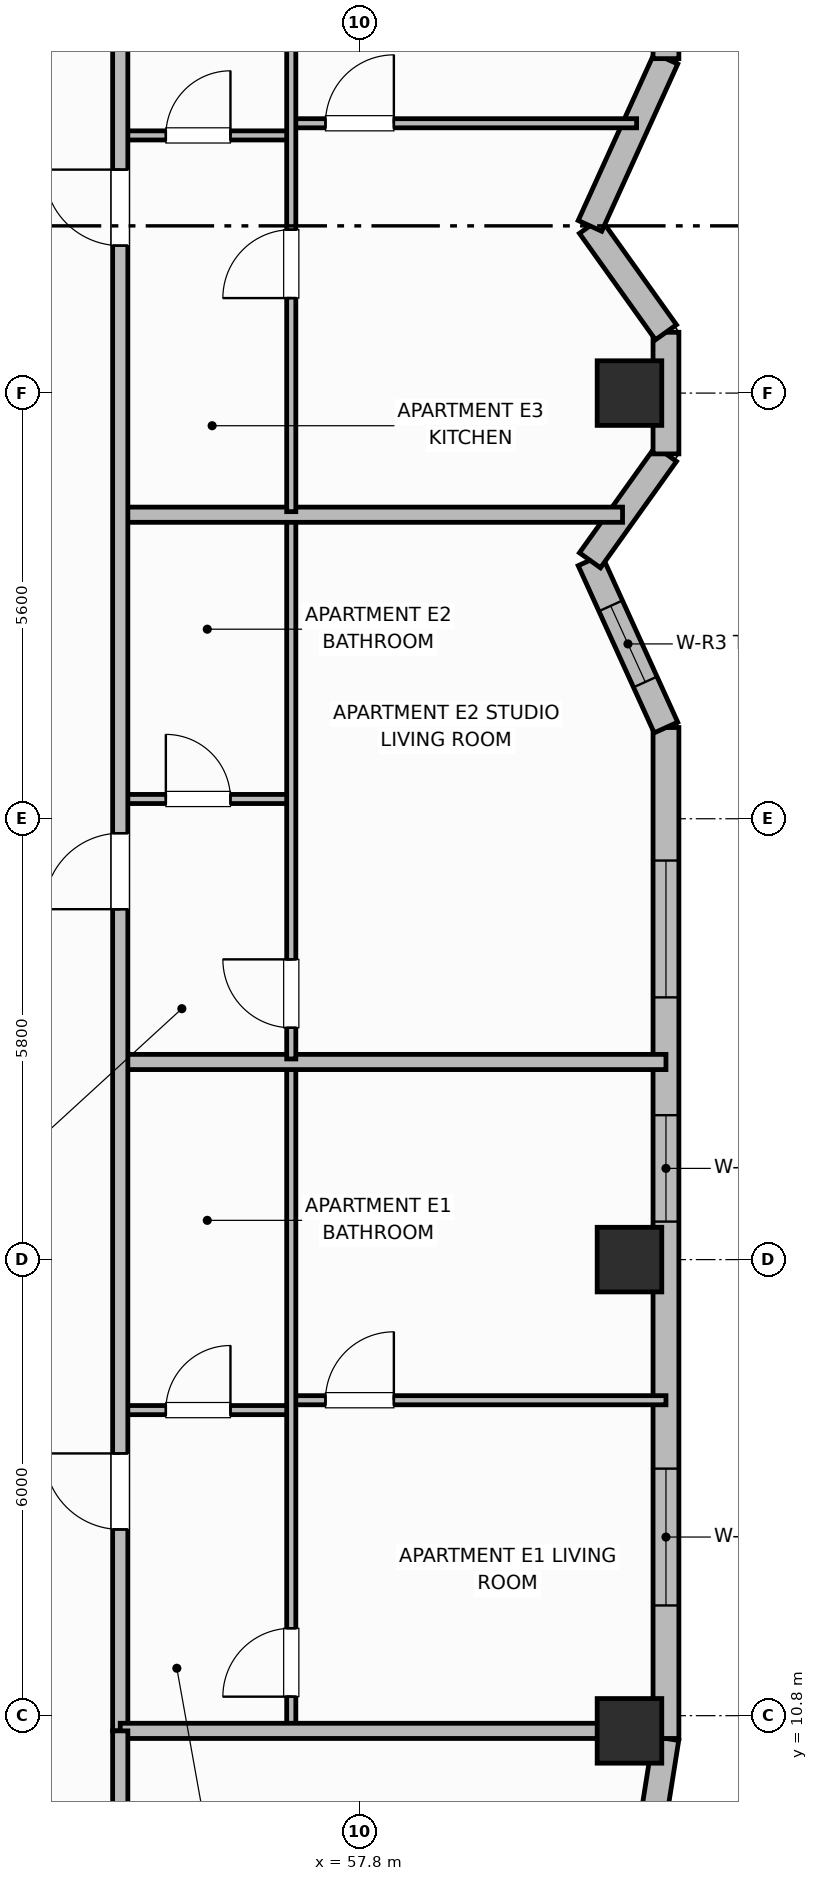
"""IFC4 building model, lengths in metres.
Left out: names, types, materials, properties, quantities, classifications, styles, units other than length and angle.
Written with IfcOpenShell. Run it as: python <this file> out.ifc"""

import sys

from ifc_helpers import new_model, si_unit, direction, frame, frame_2d, origin, origin_2d, place, context, subcontext, project, spatial, rectangle, extrude, element, fill, save


model = new_model("IFC4")
c1 = context("Model", 3, precision=1e-05, world=origin(), true_north=direction((0.0, 1.0)))
c2 = subcontext(c1, "Body", "Model", "MODEL_VIEW")
j1 = project(units=[si_unit("LENGTHUNIT", "METRE"), si_unit("PLANEANGLEUNIT", "RADIAN")], contexts=[c1])
p1 = place(None, origin())
s1 = spatial("IfcSite", under=j1, at=p1, CompositionType="ELEMENT")
p2 = place(p1, origin())
s2 = spatial("IfcBuilding", under=s1, at=p2, CompositionType="ELEMENT")
p3 = place(p2, frame((0.0, 0.0, 218.4)))
s3 = spatial("IfcBuildingStorey", under=s2, at=p3, CompositionType="ELEMENT", Elevation=218.4)
for number, where, z_axis, x_axis in (
    (1, (61.35, 10.6, 0.0), (0.0, 0.0, 1.0), (1.0, 0.0, 0.0)),
    (2, (61.35, 16.8, 0.0), (0.0, 0.0, 1.0), (1.0, 0.0, 0.0)),
    (3, (61.35, 28.2, 0.0), (0.0, 0.0, 1.0), (1.0, 0.0, 0.0)),
):
    element("IfcColumn", number, at=place(p3, frame(where, z_axis=z_axis, x_axis=x_axis)), inside=s3, PredefinedType="COLUMN", context=c2, shape_type="SweptSolid", body=[
        extrude(rectangle(XDim=0.85, YDim=0.85, at=origin_2d()), origin(), (0.0, 0.0, 1.0), 3.7),
    ])
p4 = place(p3, frame((61.652, 9.378, 0.0), z_axis=(0.0, 0.0, 1.0), x_axis=(0.156514556949, 0.987675651954, 0.0)))
e4 = element("IfcWall", 4, at=p4, inside=s3, PredefinedType="SOLIDWALL", context=c2, shape_type="SweptSolid", body=[
    extrude(rectangle(XDim=1.135, YDim=0.34, at=frame_2d((0.568, 0.0))), origin(), (0.0, 0.0, 1.0), 2.72),
])
p5 = place(p3, frame((61.83, 10.5, 0.0), z_axis=(0.0, 0.0, 1.0), x_axis=(0.0, 1.0, 0.0)))
e5 = element("IfcWall", 5, at=p5, inside=s3, PredefinedType="SOLIDWALL", context=c2, shape_type="SweptSolid", body=[
    extrude(rectangle(XDim=13.3, YDim=0.34, at=frame_2d((6.65, 0.0))), origin(), (0.0, 0.0, 1.0), 2.72),
])
p6 = place(p5, frame((1.75, 0.0, 0.75)))
e6 = element("IfcOpeningElement", 6, at=p6, cuts=e5, PredefinedType="OPENING", context=c2, shape_type="SweptSolid", body=[
    extrude(rectangle(XDim=1.8, YDim=1.85, at=frame_2d((0.9, 0.925))), frame((0.0, 0.18, 0.0), z_axis=(0.0, -1.0, 0.0), x_axis=(1.0, 0.0, 0.0)), (0.0, 0.0, 1.0), 0.36),
])
p7 = place(p5, frame((6.8, 0.0, 0.71)))
e7 = element("IfcOpeningElement", 7, at=p7, cuts=e5, PredefinedType="OPENING", context=c2, shape_type="SweptSolid", body=[
    extrude(rectangle(XDim=1.4, YDim=1.85, at=frame_2d((0.7, 0.925))), frame((0.0, 0.18, 0.0), z_axis=(0.0, -1.0, 0.0), x_axis=(1.0, 0.0, 0.0)), (0.0, 0.0, 1.0), 0.36),
])
p8 = place(p5, frame((9.75, 0.0, 0.75)))
e8 = element("IfcOpeningElement", 8, at=p8, cuts=e5, PredefinedType="OPENING", context=c2, shape_type="SweptSolid", body=[
    extrude(rectangle(XDim=1.8, YDim=1.85, at=frame_2d((0.9, 0.925))), frame((0.0, 0.18, 0.0), z_axis=(0.0, -1.0, 0.0), x_axis=(1.0, 0.0, 0.0)), (0.0, 0.0, 1.0), 0.36),
])
p9 = place(p3, frame((61.83, 23.8, 0.0), z_axis=(0.0, 0.0, 1.0), x_axis=(-0.413810555983, 0.910363017569, 0.0)))
e9 = element("IfcWall", 9, at=p9, inside=s3, PredefinedType="SOLIDWALL", context=c2, shape_type="SweptSolid", body=[
    extrude(rectangle(XDim=2.417, YDim=0.34, at=frame_2d((1.208, 0.0))), origin(), (0.0, 0.0, 1.0), 2.72),
])
p10 = place(p9, frame((0.658, 0.0, 0.91)))
e10 = element("IfcOpeningElement", 10, at=p10, cuts=e9, PredefinedType="OPENING", context=c2, shape_type="SweptSolid", body=[
    extrude(rectangle(XDim=1.1, YDim=1.65, at=frame_2d((0.55, 0.825))), frame((0.0, 0.18, 0.0), z_axis=(0.0, -1.0, 0.0), x_axis=(1.0, 0.0, 0.0)), (0.0, 0.0, 1.0), 0.36),
])
p11 = place(p3, frame((60.83, 26.0, 0.0), z_axis=(0.0, 0.0, 1.0), x_axis=(0.581265041318, 0.813714293681, 0.0)))
e11 = element("IfcWall", 11, at=p11, inside=s3, PredefinedType="SOLIDWALL", context=c2, shape_type="SweptSolid", body=[
    extrude(rectangle(XDim=1.72, YDim=0.34, at=frame_2d((0.86, 0.0))), origin(), (0.0, 0.0, 1.0), 2.72),
])
p12 = place(p3, frame((61.83, 27.4, 0.0), z_axis=(0.0, 0.0, 1.0), x_axis=(0.0, 1.0, 0.0)))
e12 = element("IfcWall", 12, at=p12, inside=s3, PredefinedType="SOLIDWALL", context=c2, shape_type="SweptSolid", body=[
    extrude(rectangle(XDim=1.6, YDim=0.34, at=frame_2d((0.8, 0.0))), origin(), (0.0, 0.0, 1.0), 2.72),
])
p13 = place(p3, frame((61.83, 29.0, 0.0), z_axis=(0.0, 0.0, 1.0), x_axis=(-0.581265041318, 0.813714293681, 0.0)))
e13 = element("IfcWall", 13, at=p13, inside=s3, PredefinedType="SOLIDWALL", context=c2, shape_type="SweptSolid", body=[
    extrude(rectangle(XDim=1.72, YDim=0.34, at=frame_2d((0.86, 0.0))), origin(), (0.0, 0.0, 1.0), 2.72),
])
p14 = place(p3, frame((60.83, 30.4, 0.0), z_axis=(0.0, 0.0, 1.0), x_axis=(0.413772500085, 0.910380315128, 0.0)))
e14 = element("IfcWall", 14, at=p14, inside=s3, PredefinedType="SOLIDWALL", context=c2, shape_type="SweptSolid", body=[
    extrude(rectangle(XDim=2.417, YDim=0.34, at=frame_2d((1.208, 0.0))), origin(), (0.0, 0.0, 1.0), 2.72),
])
p15 = place(p3, frame((61.83, 32.6, 0.0), z_axis=(0.0, 0.0, 1.0), x_axis=(0.0, 1.0, 0.0)))
e15 = element("IfcWall", 15, at=p15, inside=s3, PredefinedType="SOLIDWALL", context=c2, shape_type="SweptSolid", body=[
    extrude(rectangle(XDim=13.3, YDim=0.34, at=frame_2d((6.65, 0.0))), origin(), (0.0, 0.0, 1.0), 2.72),
])
p16 = place(p15, frame((1.7, 0.0, 0.0)))
e16 = element("IfcOpeningElement", 16, at=p16, cuts=e15, PredefinedType="OPENING", context=c2, shape_type="SweptSolid", body=[
    extrude(rectangle(XDim=1.6, YDim=2.1, at=frame_2d((0.8, 1.05))), frame((0.0, 0.18, 0.0), z_axis=(0.0, -1.0, 0.0), x_axis=(1.0, 0.0, 0.0)), (0.0, 0.0, 1.0), 0.36),
])
p17 = place(p15, frame((9.85, 0.0, 0.7)))
e17 = element("IfcOpeningElement", 17, at=p17, cuts=e15, PredefinedType="OPENING", context=c2, shape_type="SweptSolid", body=[
    extrude(rectangle(XDim=1.6, YDim=1.9, at=frame_2d((0.8, 0.95))), frame((0.0, 0.18, 0.0), z_axis=(0.0, -1.0, 0.0), x_axis=(1.0, 0.0, 0.0)), (0.0, 0.0, 1.0), 0.36),
])
p18 = place(p3, frame((54.65, 14.82, 0.0), z_axis=(0.0, 0.0, 1.0), x_axis=(1.0, 0.0, 0.0)))
e18 = element("IfcWall", 18, at=p18, inside=s3, PredefinedType="PARTITIONING", context=c2, shape_type="SweptSolid", body=[
    extrude(rectangle(XDim=2.25, YDim=0.12, at=frame_2d((1.125, 0.0))), origin(), (0.0, 0.0, 1.0), 2.55),
])
p19 = place(p18, frame((0.6, 0.0, 0.0)))
e19 = element("IfcOpeningElement", 19, at=p19, cuts=e18, PredefinedType="OPENING", context=c2, shape_type="SweptSolid", body=[
    extrude(rectangle(XDim=0.85, YDim=2.1, at=frame_2d((0.425, 1.05))), frame((0.0, 0.07, 0.0), z_axis=(0.0, -1.0, 0.0), x_axis=(1.0, 0.0, 0.0)), (0.0, 0.0, 1.0), 0.14),
])
p20 = place(p3, frame((56.9, 14.95, 0.0), z_axis=(0.0, 0.0, 1.0), x_axis=(1.0, 0.0, 0.0)))
e20 = element("IfcWall", 20, at=p20, inside=s3, PredefinedType="PARTITIONING", context=c2, shape_type="SweptSolid", body=[
    extrude(rectangle(XDim=4.93, YDim=0.12, at=frame_2d((2.465, 0.0))), origin(), (0.0, 0.0, 1.0), 2.55),
])
p21 = place(p20, frame((0.45, 0.0, 0.0)))
e21 = element("IfcOpeningElement", 21, at=p21, cuts=e20, PredefinedType="OPENING", context=c2, shape_type="SweptSolid", body=[
    extrude(rectangle(XDim=0.9, YDim=2.1, at=frame_2d((0.45, 1.05))), frame((0.0, 0.07, 0.0), z_axis=(0.0, -1.0, 0.0), x_axis=(1.0, 0.0, 0.0)), (0.0, 0.0, 1.0), 0.14),
])
p22 = place(p3, frame((56.9, 10.64, 0.0), z_axis=(0.0, 0.0, 1.0), x_axis=(0.0, 1.0, 0.0)))
e22 = element("IfcWall", 22, at=p22, inside=s3, PredefinedType="PARTITIONING", context=c2, shape_type="SweptSolid", body=[
    extrude(rectangle(XDim=8.72, YDim=0.12, at=frame_2d((4.36, 0.0))), origin(), (0.0, 0.0, 1.0), 2.55),
])
p23 = place(p22, frame((0.41, 0.0, 0.0)))
e23 = element("IfcOpeningElement", 23, at=p23, cuts=e22, PredefinedType="OPENING", context=c2, shape_type="SweptSolid", body=[
    extrude(rectangle(XDim=0.9, YDim=2.1, at=frame_2d((0.45, 1.05))), frame((0.0, 0.07, 0.0), z_axis=(0.0, -1.0, 0.0), x_axis=(1.0, 0.0, 0.0)), (0.0, 0.0, 1.0), 0.14),
])
p24 = place(p3, frame((54.65, 19.4, 0.0), z_axis=(0.0, 0.0, 1.0), x_axis=(1.0, 0.0, 0.0)))
e24 = element("IfcWall", 24, at=p24, inside=s3, PredefinedType="PARTITIONING", context=c2, shape_type="SweptSolid", body=[
    extrude(rectangle(XDim=7.18, YDim=0.2, at=frame_2d((3.59, 0.0))), origin(), (0.0, 0.0, 1.0), 2.55),
])
p25 = place(p3, frame((54.65, 22.86, 0.0), z_axis=(0.0, 0.0, 1.0), x_axis=(1.0, 0.0, 0.0)))
e25 = element("IfcWall", 25, at=p25, inside=s3, PredefinedType="PARTITIONING", context=c2, shape_type="SweptSolid", body=[
    extrude(rectangle(XDim=2.25, YDim=0.12, at=frame_2d((1.125, 0.0))), origin(), (0.0, 0.0, 1.0), 2.55),
])
p26 = place(p25, frame((0.6, 0.0, 0.0)))
e26 = element("IfcOpeningElement", 26, at=p26, cuts=e25, PredefinedType="OPENING", context=c2, shape_type="SweptSolid", body=[
    extrude(rectangle(XDim=0.85, YDim=2.1, at=frame_2d((0.425, 1.05))), frame((0.0, 0.07, 0.0), z_axis=(0.0, -1.0, 0.0), x_axis=(1.0, 0.0, 0.0)), (0.0, 0.0, 1.0), 0.14),
])
p27 = place(p3, frame((56.9, 19.44, 0.0), z_axis=(0.0, 0.0, 1.0), x_axis=(0.0, 1.0, 0.0)))
e27 = element("IfcWall", 27, at=p27, inside=s3, PredefinedType="PARTITIONING", context=c2, shape_type="SweptSolid", body=[
    extrude(rectangle(XDim=7.12, YDim=0.12, at=frame_2d((3.56, 0.0))), origin(), (0.0, 0.0, 1.0), 2.55),
])
p28 = place(p27, frame((0.41, 0.0, 0.0)))
e28 = element("IfcOpeningElement", 28, at=p28, cuts=e27, PredefinedType="OPENING", context=c2, shape_type="SweptSolid", body=[
    extrude(rectangle(XDim=0.9, YDim=2.1, at=frame_2d((0.45, 1.05))), frame((0.0, 0.07, 0.0), z_axis=(0.0, -1.0, 0.0), x_axis=(1.0, 0.0, 0.0)), (0.0, 0.0, 1.0), 0.14),
])
p29 = place(p3, frame((54.65, 26.6, 0.0), z_axis=(0.0, 0.0, 1.0), x_axis=(1.0, 0.0, 0.0)))
e29 = element("IfcWall", 29, at=p29, inside=s3, PredefinedType="PARTITIONING", context=c2, shape_type="SweptSolid", body=[
    extrude(rectangle(XDim=6.609, YDim=0.2, at=frame_2d((3.304, 0.0))), origin(), (0.0, 0.0, 1.0), 2.55),
])
p30 = place(p3, frame((54.65, 31.59, 0.0), z_axis=(0.0, 0.0, 1.0), x_axis=(1.0, 0.0, 0.0)))
e30 = element("IfcWall", 30, at=p30, inside=s3, PredefinedType="PARTITIONING", context=c2, shape_type="SweptSolid", body=[
    extrude(rectangle(XDim=2.25, YDim=0.12, at=frame_2d((1.125, 0.0))), origin(), (0.0, 0.0, 1.0), 2.55),
])
p31 = place(p30, frame((0.6, 0.0, 0.0)))
e31 = element("IfcOpeningElement", 31, at=p31, cuts=e30, PredefinedType="OPENING", context=c2, shape_type="SweptSolid", body=[
    extrude(rectangle(XDim=0.85, YDim=2.1, at=frame_2d((0.425, 1.05))), frame((0.0, 0.07, 0.0), z_axis=(0.0, -1.0, 0.0), x_axis=(1.0, 0.0, 0.0)), (0.0, 0.0, 1.0), 0.14),
])
p32 = place(p3, frame((56.9, 31.75, 0.0), z_axis=(0.0, 0.0, 1.0), x_axis=(1.0, 0.0, 0.0)))
e32 = element("IfcWall", 32, at=p32, inside=s3, PredefinedType="PARTITIONING", context=c2, shape_type="SweptSolid", body=[
    extrude(rectangle(XDim=4.544, YDim=0.12, at=frame_2d((2.272, 0.0))), origin(), (0.0, 0.0, 1.0), 2.55),
])
p33 = place(p32, frame((0.45, 0.0, 0.0)))
e33 = element("IfcOpeningElement", 33, at=p33, cuts=e32, PredefinedType="OPENING", context=c2, shape_type="SweptSolid", body=[
    extrude(rectangle(XDim=0.9, YDim=2.1, at=frame_2d((0.45, 1.05))), frame((0.0, 0.07, 0.0), z_axis=(0.0, -1.0, 0.0), x_axis=(1.0, 0.0, 0.0)), (0.0, 0.0, 1.0), 0.14),
])
p34 = place(p3, frame((56.9, 26.64, 0.0), z_axis=(0.0, 0.0, 1.0), x_axis=(0.0, 1.0, 0.0)))
e34 = element("IfcWall", 34, at=p34, inside=s3, PredefinedType="PARTITIONING", context=c2, shape_type="SweptSolid", body=[
    extrude(rectangle(XDim=10.32, YDim=0.12, at=frame_2d((5.16, 0.0))), origin(), (0.0, 0.0, 1.0), 2.55),
])
p35 = place(p34, frame((2.81, 0.0, 0.0)))
e35 = element("IfcOpeningElement", 35, at=p35, cuts=e34, PredefinedType="OPENING", context=c2, shape_type="SweptSolid", body=[
    extrude(rectangle(XDim=0.9, YDim=2.1, at=frame_2d((0.45, 1.05))), frame((0.0, 0.07, 0.0), z_axis=(0.0, -1.0, 0.0), x_axis=(1.0, 0.0, 0.0)), (0.0, 0.0, 1.0), 0.14),
])
p36 = place(p3, frame((54.65, 10.6, 0.0), z_axis=(0.0, 0.0, 1.0), x_axis=(0.0, 1.0, 0.0)))
e36 = element("IfcWall", 36, at=p36, inside=s3, PredefinedType="PARTITIONING", context=c2, shape_type="SweptSolid", body=[
    extrude(rectangle(XDim=35.2, YDim=0.2, at=frame_2d((17.6, 0.0))), origin(), (0.0, 0.0, 1.0), 2.55),
])
p37 = place(p36, frame((2.65, 0.0, 0.0)))
e37 = element("IfcOpeningElement", 37, at=p37, cuts=e36, PredefinedType="OPENING", context=c2, shape_type="SweptSolid", body=[
    extrude(rectangle(XDim=1.0, YDim=2.15, at=frame_2d((0.5, 1.075))), frame((0.0, 0.11, 0.0), z_axis=(0.0, -1.0, 0.0), x_axis=(1.0, 0.0, 0.0)), (0.0, 0.0, 1.0), 0.22),
])
p38 = place(p36, frame((10.81, 0.0, 0.0)))
e38 = element("IfcOpeningElement", 38, at=p38, cuts=e36, PredefinedType="OPENING", context=c2, shape_type="SweptSolid", body=[
    extrude(rectangle(XDim=1.0, YDim=2.15, at=frame_2d((0.5, 1.075))), frame((0.0, 0.11, 0.0), z_axis=(0.0, -1.0, 0.0), x_axis=(1.0, 0.0, 0.0)), (0.0, 0.0, 1.0), 0.22),
])
p39 = place(p36, frame((19.54, 0.0, 0.0)))
e39 = element("IfcOpeningElement", 39, at=p39, cuts=e36, PredefinedType="OPENING", context=c2, shape_type="SweptSolid", body=[
    extrude(rectangle(XDim=1.0, YDim=2.15, at=frame_2d((0.5, 1.075))), frame((0.0, 0.11, 0.0), z_axis=(0.0, -1.0, 0.0), x_axis=(1.0, 0.0, 0.0)), (0.0, 0.0, 1.0), 0.22),
])
p40 = place(p36, frame((26.95, 0.0, 0.0)))
e40 = element("IfcOpeningElement", 40, at=p40, cuts=e36, PredefinedType="OPENING", context=c2, shape_type="SweptSolid", body=[
    extrude(rectangle(XDim=1.0, YDim=2.15, at=frame_2d((0.5, 1.075))), frame((0.0, 0.11, 0.0), z_axis=(0.0, -1.0, 0.0), x_axis=(1.0, 0.0, 0.0)), (0.0, 0.0, 1.0), 0.22),
])
p41 = place(p3, frame((54.65, 10.6, 0.0), z_axis=(0.0, 0.0, 1.0), x_axis=(1.0, 0.0, 0.0)))
e41 = element("IfcWall", 41, at=p41, inside=s3, PredefinedType="PARTITIONING", context=c2, shape_type="SweptSolid", body=[
    extrude(rectangle(XDim=6.76, YDim=0.2, at=frame_2d((3.38, 0.0))), origin(), (0.0, 0.0, 1.0), 2.55),
])
p42 = place(p3, frame((54.65, 6.87, 0.0), z_axis=(0.0, 0.0, 1.0), x_axis=(0.0, 1.0, 0.0)))
e42 = element("IfcWall", 42, at=p42, inside=s3, PredefinedType="PARTITIONING", context=c2, shape_type="SweptSolid", body=[
    extrude(rectangle(XDim=3.73, YDim=0.2, at=frame_2d((1.865, 0.0))), origin(), (0.0, 0.0, 1.0), 2.55),
])
p43 = place(p6, origin())
e43 = element("IfcWindow", 43, at=p43, inside=s3, PartitioningType="SINGLE_PANEL", PredefinedType="WINDOW", context=c2, shape_type="SweptSolid", body=[
    extrude(rectangle(XDim=1.8, YDim=1.85, at=frame_2d((0.9, 0.925))), frame((0.0, 0.03, 0.0), z_axis=(0.0, -1.0, 0.0), x_axis=(1.0, 0.0, 0.0)), (0.0, 0.0, 1.0), 0.06),
])
fill(e6, e43)
p44 = place(p7, origin())
e44 = element("IfcWindow", 44, at=p44, inside=s3, PartitioningType="SINGLE_PANEL", PredefinedType="WINDOW", context=c2, shape_type="SweptSolid", body=[
    extrude(rectangle(XDim=1.4, YDim=1.85, at=frame_2d((0.7, 0.925))), frame((0.0, 0.03, 0.0), z_axis=(0.0, -1.0, 0.0), x_axis=(1.0, 0.0, 0.0)), (0.0, 0.0, 1.0), 0.06),
])
fill(e7, e44)
p45 = place(p8, origin())
e45 = element("IfcWindow", 45, at=p45, inside=s3, PartitioningType="SINGLE_PANEL", PredefinedType="WINDOW", context=c2, shape_type="SweptSolid", body=[
    extrude(rectangle(XDim=1.8, YDim=1.85, at=frame_2d((0.9, 0.925))), frame((0.0, 0.03, 0.0), z_axis=(0.0, -1.0, 0.0), x_axis=(1.0, 0.0, 0.0)), (0.0, 0.0, 1.0), 0.06),
])
fill(e8, e45)
p46 = place(p10, origin())
e46 = element("IfcWindow", 46, at=p46, inside=s3, PartitioningType="SINGLE_PANEL", PredefinedType="WINDOW", context=c2, shape_type="SweptSolid", body=[
    extrude(rectangle(XDim=1.1, YDim=1.65, at=frame_2d((0.55, 0.825))), frame((0.0, 0.03, 0.0), z_axis=(0.0, -1.0, 0.0), x_axis=(1.0, 0.0, 0.0)), (0.0, 0.0, 1.0), 0.06),
])
fill(e10, e46)
p47 = place(p19, origin())
e47 = element("IfcDoor", 47, at=p47, inside=s3, OperationType="SINGLE_SWING_RIGHT", PredefinedType="DOOR", context=c2, shape_type="SweptSolid", body=[
    extrude(rectangle(XDim=0.85, YDim=2.1, at=frame_2d((0.425, 1.05))), frame((0.0, 0.025, 0.0), z_axis=(0.0, -1.0, 0.0), x_axis=(1.0, 0.0, 0.0)), (0.0, 0.0, 1.0), 0.05),
])
fill(e19, e47)
p48 = place(p21, origin())
e48 = element("IfcDoor", 48, at=p48, inside=s3, OperationType="SINGLE_SWING_RIGHT", PredefinedType="DOOR", context=c2, shape_type="SweptSolid", body=[
    extrude(rectangle(XDim=0.9, YDim=2.1, at=frame_2d((0.45, 1.05))), frame((0.0, 0.025, 0.0), z_axis=(0.0, -1.0, 0.0), x_axis=(1.0, 0.0, 0.0)), (0.0, 0.0, 1.0), 0.05),
])
fill(e21, e48)
p49 = place(p23, origin())
e49 = element("IfcDoor", 49, at=p49, inside=s3, OperationType="SINGLE_SWING_LEFT", PredefinedType="DOOR", context=c2, shape_type="SweptSolid", body=[
    extrude(rectangle(XDim=0.9, YDim=2.1, at=frame_2d((0.45, 1.05))), frame((0.0, 0.025, 0.0), z_axis=(0.0, -1.0, 0.0), x_axis=(1.0, 0.0, 0.0)), (0.0, 0.0, 1.0), 0.05),
])
fill(e23, e49)
p50 = place(p26, origin())
e50 = element("IfcDoor", 50, at=p50, inside=s3, OperationType="SINGLE_SWING_LEFT", PredefinedType="DOOR", context=c2, shape_type="SweptSolid", body=[
    extrude(rectangle(XDim=0.85, YDim=2.1, at=frame_2d((0.425, 1.05))), frame((0.0, 0.025, 0.0), z_axis=(0.0, -1.0, 0.0), x_axis=(1.0, 0.0, 0.0)), (0.0, 0.0, 1.0), 0.05),
])
fill(e26, e50)
p51 = place(p28, origin())
e51 = element("IfcDoor", 51, at=p51, inside=s3, OperationType="SINGLE_SWING_RIGHT", PredefinedType="DOOR", context=c2, shape_type="SweptSolid", body=[
    extrude(rectangle(XDim=0.9, YDim=2.1, at=frame_2d((0.45, 1.05))), frame((0.0, 0.025, 0.0), z_axis=(0.0, -1.0, 0.0), x_axis=(1.0, 0.0, 0.0)), (0.0, 0.0, 1.0), 0.05),
])
fill(e28, e51)
p52 = place(p31, origin())
e52 = element("IfcDoor", 52, at=p52, inside=s3, OperationType="SINGLE_SWING_RIGHT", PredefinedType="DOOR", context=c2, shape_type="SweptSolid", body=[
    extrude(rectangle(XDim=0.85, YDim=2.1, at=frame_2d((0.425, 1.05))), frame((0.0, 0.025, 0.0), z_axis=(0.0, -1.0, 0.0), x_axis=(1.0, 0.0, 0.0)), (0.0, 0.0, 1.0), 0.05),
])
fill(e31, e52)
p53 = place(p33, origin())
e53 = element("IfcDoor", 53, at=p53, inside=s3, OperationType="SINGLE_SWING_RIGHT", PredefinedType="DOOR", context=c2, shape_type="SweptSolid", body=[
    extrude(rectangle(XDim=0.9, YDim=2.1, at=frame_2d((0.45, 1.05))), frame((0.0, 0.025, 0.0), z_axis=(0.0, -1.0, 0.0), x_axis=(1.0, 0.0, 0.0)), (0.0, 0.0, 1.0), 0.05),
])
fill(e33, e53)
p54 = place(p35, origin())
e54 = element("IfcDoor", 54, at=p54, inside=s3, OperationType="SINGLE_SWING_LEFT", PredefinedType="DOOR", context=c2, shape_type="SweptSolid", body=[
    extrude(rectangle(XDim=0.9, YDim=2.1, at=frame_2d((0.45, 1.05))), frame((0.0, 0.025, 0.0), z_axis=(0.0, -1.0, 0.0), x_axis=(1.0, 0.0, 0.0)), (0.0, 0.0, 1.0), 0.05),
])
fill(e35, e54)
p55 = place(p37, origin())
e55 = element("IfcDoor", 55, at=p55, inside=s3, OperationType="SINGLE_SWING_RIGHT", PredefinedType="DOOR", context=c2, shape_type="SweptSolid", body=[
    extrude(rectangle(XDim=1.0, YDim=2.15, at=frame_2d((0.5, 1.075))), frame((0.0, 0.025, 0.0), z_axis=(0.0, -1.0, 0.0), x_axis=(1.0, 0.0, 0.0)), (0.0, 0.0, 1.0), 0.05),
])
fill(e37, e55)
p56 = place(p38, origin())
e56 = element("IfcDoor", 56, at=p56, inside=s3, OperationType="SINGLE_SWING_LEFT", PredefinedType="DOOR", context=c2, shape_type="SweptSolid", body=[
    extrude(rectangle(XDim=1.0, YDim=2.15, at=frame_2d((0.5, 1.075))), frame((0.0, 0.025, 0.0), z_axis=(0.0, -1.0, 0.0), x_axis=(1.0, 0.0, 0.0)), (0.0, 0.0, 1.0), 0.05),
])
fill(e38, e56)
p57 = place(p39, origin())
e57 = element("IfcDoor", 57, at=p57, inside=s3, OperationType="SINGLE_SWING_RIGHT", PredefinedType="DOOR", context=c2, shape_type="SweptSolid", body=[
    extrude(rectangle(XDim=1.0, YDim=2.15, at=frame_2d((0.5, 1.075))), frame((0.0, 0.025, 0.0), z_axis=(0.0, -1.0, 0.0), x_axis=(1.0, 0.0, 0.0)), (0.0, 0.0, 1.0), 0.05),
])
fill(e39, e57)
save(model, sys.argv[1])
